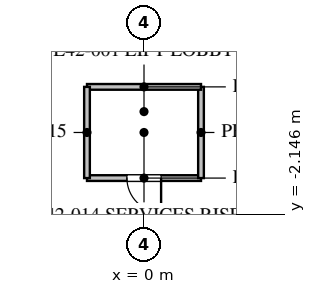
"""IFC4 building model, lengths in metres.
Left out: names, types, materials, properties, quantities, classifications, styles, units other than length and angle.
Written with IfcOpenShell. Run it as: python <this file> out.ifc"""

import sys

from ifc_helpers import new_model, si_unit, direction, frame, frame_2d, origin, place, context, subcontext, project, spatial, rectangle, extrude, element, fill, save


model = new_model("IFC4")
c1 = context("Model", 3, precision=1e-05, world=origin(), true_north=direction((0.0, 1.0)))
c2 = subcontext(c1, "Body", "Model", "MODEL_VIEW")
j1 = project(units=[si_unit("LENGTHUNIT", "METRE"), si_unit("PLANEANGLEUNIT", "RADIAN")], contexts=[c1])
p1 = place(None, origin())
s1 = spatial("IfcSite", under=j1, at=p1, CompositionType="ELEMENT")
p2 = place(p1, origin())
s2 = spatial("IfcBuilding", under=s1, at=p2, CompositionType="ELEMENT")
p3 = place(p2, frame((0.0, 0.0, 184.7)))
s3 = spatial("IfcBuildingStorey", under=s2, at=p3, CompositionType="ELEMENT", Elevation=184.7)
p4 = place(p3, frame((-1.5, -1.2, 0.0), z_axis=(0.0, 0.0, 1.0), x_axis=(1.0, 0.0, 0.0)))
e1 = element("IfcWall", 1, at=p4, inside=s3, PredefinedType="PARTITIONING", context=c2, shape_type="SweptSolid", body=[
    extrude(rectangle(XDim=3.0, YDim=0.15, at=frame_2d((1.5, 0.0))), origin(), (0.0, 0.0, 1.0), 4.8),
])
p5 = place(p4, frame((1.05, 0.0, 0.0)))
e2 = element("IfcOpeningElement", 2, at=p5, cuts=e1, PredefinedType="OPENING", context=c2, shape_type="SweptSolid", body=[
    extrude(rectangle(XDim=0.9, YDim=2.1, at=frame_2d((0.45, 1.05))), frame((0.0, 0.085, 0.0), z_axis=(0.0, -1.0, 0.0), x_axis=(1.0, 0.0, 0.0)), (0.0, 0.0, 1.0), 0.17),
])
p6 = place(p3, frame((1.5, -1.2, 0.0), z_axis=(0.0, 0.0, 1.0), x_axis=(0.0, 1.0, 0.0)))
e3 = element("IfcWall", 3, at=p6, inside=s3, PredefinedType="PARTITIONING", context=c2, shape_type="SweptSolid", body=[
    extrude(rectangle(XDim=2.4, YDim=0.15, at=frame_2d((1.2, 0.0))), origin(), (0.0, 0.0, 1.0), 4.8),
])
p7 = place(p3, frame((1.5, 1.2, 0.0), z_axis=(0.0, 0.0, 1.0), x_axis=(-1.0, 0.0, 0.0)))
e4 = element("IfcWall", 4, at=p7, inside=s3, PredefinedType="PARTITIONING", context=c2, shape_type="SweptSolid", body=[
    extrude(rectangle(XDim=3.0, YDim=0.15, at=frame_2d((1.5, 0.0))), origin(), (0.0, 0.0, 1.0), 4.8),
])
p8 = place(p3, frame((-1.5, 1.2, 0.0), z_axis=(0.0, 0.0, 1.0), x_axis=(0.0, -1.0, 0.0)))
e5 = element("IfcWall", 5, at=p8, inside=s3, PredefinedType="PARTITIONING", context=c2, shape_type="SweptSolid", body=[
    extrude(rectangle(XDim=2.4, YDim=0.15, at=frame_2d((1.2, 0.0))), origin(), (0.0, 0.0, 1.0), 4.8),
])
p9 = place(p5, frame((0.9, 0.0, 0.0), z_axis=(0.0, 0.0, 1.0), x_axis=(-1.0, 0.0, 0.0)))
e6 = element("IfcDoor", 6, at=p9, inside=s3, OperationType="SINGLE_SWING_LEFT", PredefinedType="DOOR", context=c2, shape_type="SweptSolid", body=[
    extrude(rectangle(XDim=0.9, YDim=2.1, at=frame_2d((0.45, 1.05))), frame((0.0, 0.025, 0.0), z_axis=(0.0, -1.0, 0.0), x_axis=(1.0, 0.0, 0.0)), (0.0, 0.0, 1.0), 0.05),
])
fill(e2, e6)
save(model, sys.argv[1])
